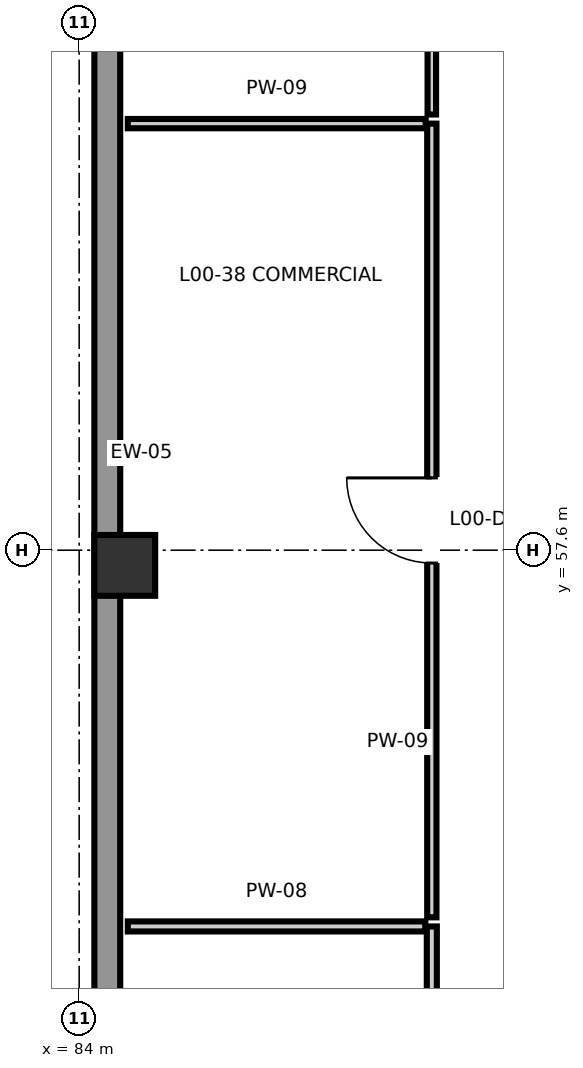
"""IFC4 building model, lengths in metres.
Left out: names, types, materials, properties, quantities, classifications, styles, units other than length and angle.
Written with IfcOpenShell. Run it as: python <this file> out.ifc"""

import sys

from ifc_helpers import new_model, si_unit, direction, frame, frame_2d, origin, origin_2d, place, context, subcontext, project, spatial, rectangle, extrude, element, fill, save


model = new_model("IFC4")
c1 = context("Model", 3, precision=1e-05, world=origin(), true_north=direction((0.0, 1.0)))
c2 = subcontext(c1, "Body", "Model", "MODEL_VIEW")
j1 = project(units=[si_unit("LENGTHUNIT", "METRE"), si_unit("PLANEANGLEUNIT", "RADIAN")], contexts=[c1])
p1 = place(None, origin())
s1 = spatial("IfcSite", under=j1, at=p1, CompositionType="ELEMENT")
p2 = place(p1, origin())
s2 = spatial("IfcBuilding", under=s1, at=p2, CompositionType="ELEMENT")
p3 = place(p2, origin())
s3 = spatial("IfcBuildingStorey", under=s2, at=p3, CompositionType="ELEMENT", Elevation=0.0)
p4 = place(p3, frame((84.6, 57.4, 0.0), z_axis=(0.0, 0.0, 1.0), x_axis=(1.0, 0.0, 0.0)))
e1 = element("IfcColumn", 1, at=p4, inside=s3, PredefinedType="COLUMN", context=c2, shape_type="SweptSolid", body=[
    extrude(rectangle(XDim=0.8, YDim=0.8, at=origin_2d()), origin(), (0.0, 0.0, 1.0), 5.4),
])
p5 = place(p3, frame((84.37, 85.465, 0.0), z_axis=(0.0, 0.0, 1.0), x_axis=(0.0, -1.0, 0.0)))
e2 = element("IfcWall", 2, at=p5, inside=s3, PredefinedType="SOLIDWALL", context=c2, shape_type="SweptSolid", body=[
    extrude(rectangle(XDim=44.11, YDim=0.34, at=frame_2d((22.055, 0.0))), origin(), (0.0, 0.0, 1.0), 5.1),
])
p6 = place(p5, frame((1.0, 0.0, 0.72)))
e3 = element("IfcOpeningElement", 3, at=p6, cuts=e2, PredefinedType="OPENING", context=c2, shape_type="SweptSolid", body=[
    extrude(rectangle(XDim=2.2, YDim=1.5, at=frame_2d((1.1, 0.75))), frame((0.0, 0.185, 0.0), z_axis=(0.0, -1.0, 0.0), x_axis=(1.0, 0.0, 0.0)), (0.0, 0.0, 1.0), 0.37),
])
p7 = place(p3, frame((88.64, 41.4, 0.0), z_axis=(0.0, 0.0, 1.0), x_axis=(0.0, 1.0, 0.0)))
e4 = element("IfcWall", 4, at=p7, inside=s3, PredefinedType="PARTITIONING", context=c2, shape_type="SweptSolid", body=[
    extrude(rectangle(XDim=11.25, YDim=0.132, at=frame_2d((5.625, 0.0))), origin(), (0.0, 0.0, 1.0), 5.1),
])
p8 = place(p7, frame((5.015, 0.0, 0.0)))
e5 = element("IfcOpeningElement", 5, at=p8, cuts=e4, PredefinedType="OPENING", context=c2, shape_type="SweptSolid", body=[
    extrude(rectangle(XDim=1.22, YDim=2.18, at=frame_2d((0.61, 1.09))), frame((0.0, 0.081, 0.0), z_axis=(0.0, -1.0, 0.0), x_axis=(1.0, 0.0, 0.0)), (0.0, 0.0, 1.0), 0.162),
])
p9 = place(p3, frame((84.64, 52.65, 0.0), z_axis=(0.0, 0.0, 1.0), x_axis=(1.0, 0.0, 0.0)))
e6 = element("IfcWall", 6, at=p9, inside=s3, PredefinedType="PARTITIONING", context=c2, shape_type="SweptSolid", body=[
    extrude(rectangle(XDim=3.914, YDim=0.132, at=frame_2d((1.957, 0.0))), origin(), (0.0, 0.0, 1.0), 5.1),
])
p10 = place(p3, frame((88.64, 52.77, 0.0), z_axis=(0.0, 0.0, 1.0), x_axis=(0.0, 1.0, 0.0)))
e7 = element("IfcWall", 7, at=p10, inside=s3, PredefinedType="PARTITIONING", context=c2, shape_type="SweptSolid", body=[
    extrude(rectangle(XDim=10.442, YDim=0.122, at=frame_2d((5.221, 0.0))), origin(), (0.0, 0.0, 1.0), 5.1),
])
p11 = place(p10, frame((4.661, 0.0, 0.0)))
e8 = element("IfcOpeningElement", 8, at=p11, cuts=e7, PredefinedType="OPENING", context=c2, shape_type="SweptSolid", body=[
    extrude(rectangle(XDim=1.12, YDim=2.14, at=frame_2d((0.56, 1.07))), frame((0.0, 0.076, 0.0), z_axis=(0.0, -1.0, 0.0), x_axis=(1.0, 0.0, 0.0)), (0.0, 0.0, 1.0), 0.152),
])
p12 = place(p3, frame((84.64, 63.212, 0.0), z_axis=(0.0, 0.0, 1.0), x_axis=(1.0, 0.0, 0.0)))
e9 = element("IfcWall", 9, at=p12, inside=s3, PredefinedType="PARTITIONING", context=c2, shape_type="SweptSolid", body=[
    extrude(rectangle(XDim=3.919, YDim=0.122, at=frame_2d((1.959, 0.0))), origin(), (0.0, 0.0, 1.0), 5.1),
])
p13 = place(p3, frame((88.64, 63.332, 0.0), z_axis=(0.0, 0.0, 1.0), x_axis=(0.0, 1.0, 0.0)))
e10 = element("IfcWall", 10, at=p13, inside=s3, PredefinedType="PARTITIONING", context=c2, shape_type="SweptSolid", body=[
    extrude(rectangle(XDim=11.268, YDim=0.112, at=frame_2d((5.634, 0.0))), origin(), (0.0, 0.0, 1.0), 5.1),
])
p14 = place(p13, frame((5.089, 0.0, 0.0)))
e11 = element("IfcOpeningElement", 11, at=p14, cuts=e10, PredefinedType="OPENING", context=c2, shape_type="SweptSolid", body=[
    extrude(rectangle(XDim=1.09, YDim=2.13, at=frame_2d((0.545, 1.065))), frame((0.0, 0.071, 0.0), z_axis=(0.0, -1.0, 0.0), x_axis=(1.0, 0.0, 0.0)), (0.0, 0.0, 1.0), 0.142),
])
p15 = place(p11, frame((1.12, 0.0, 0.0), z_axis=(0.0, 0.0, 1.0), x_axis=(-1.0, 0.0, 0.0)))
e12 = element("IfcDoor", 12, at=p15, inside=s3, OperationType="SINGLE_SWING_RIGHT", PredefinedType="DOOR", context=c2, shape_type="SweptSolid", body=[
    extrude(rectangle(XDim=1.12, YDim=2.14, at=frame_2d((0.56, 1.07))), frame((0.0, 0.025, 0.0), z_axis=(0.0, -1.0, 0.0), x_axis=(1.0, 0.0, 0.0)), (0.0, 0.0, 1.0), 0.05),
])
fill(e8, e12)
save(model, sys.argv[1])
